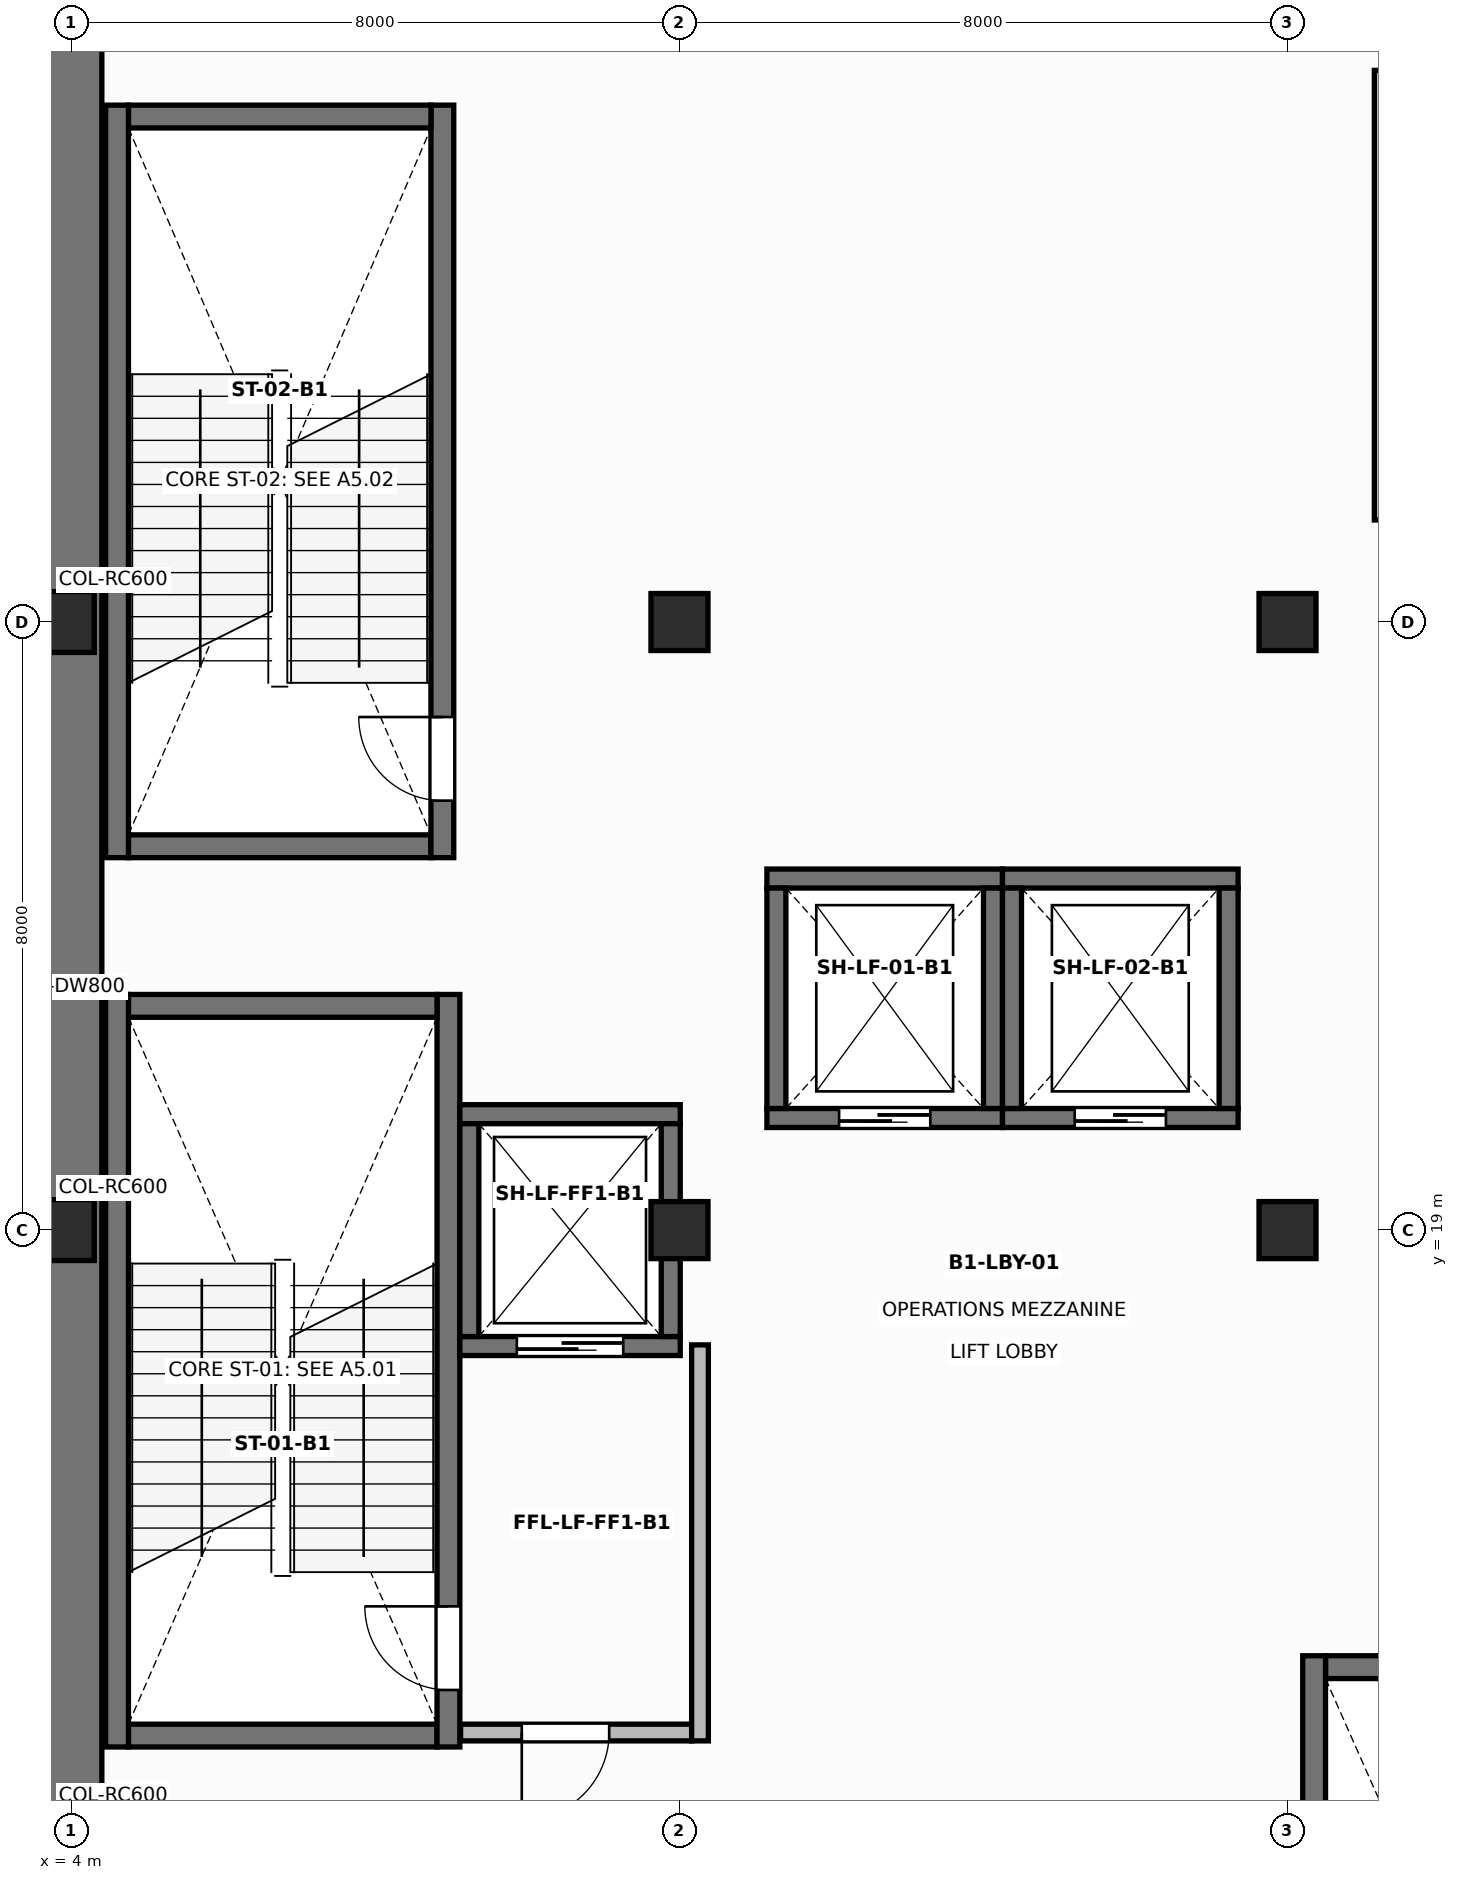
"""IFC4 building model, lengths in metres.
Left out: names, types, materials, properties, quantities, classifications, styles, units other than length and angle.
Written with IfcOpenShell. Run it as: python <this file> out.ifc"""

import sys

from ifc_helpers import new_model, si_unit, direction, frame, frame_2d, origin, origin_2d, place, context, subcontext, project, spatial, rectangle, extrude, element, fill, save


model = new_model("IFC4")
c1 = context("Model", 3, precision=1e-05, world=origin(), true_north=direction((0.0, 1.0)))
c2 = subcontext(c1, "Body", "Model", "MODEL_VIEW")
j1 = project(units=[si_unit("LENGTHUNIT", "METRE"), si_unit("PLANEANGLEUNIT", "RADIAN")], contexts=[c1])
p1 = place(None, origin())
s1 = spatial("IfcSite", under=j1, at=p1, CompositionType="ELEMENT")
p2 = place(p1, origin())
s2 = spatial("IfcBuilding", under=s1, at=p2, CompositionType="ELEMENT")
p3 = place(p2, frame((0.0, 0.0, -5.6)))
s3 = spatial("IfcBuildingStorey", under=s2, at=p3, CompositionType="ELEMENT", Elevation=-5.6)
p4 = place(p3, frame((4.0, 2.6, 0.0), z_axis=(0.0, 0.0, 1.0), x_axis=(0.0, 1.0, 0.0)))
e1 = element("IfcWall", 1, at=p4, inside=s3, PredefinedType="SOLIDWALL", context=c2, shape_type="SweptSolid", body=[
    extrude(rectangle(XDim=114.8, YDim=0.8, at=frame_2d((57.4, 0.0))), origin(), (0.0, 0.0, 1.0), 5.18),
])
for number, where, z_axis, x_axis in (
    (2, (4.0, 19.0, 0.0), (0.0, 0.0, 1.0), (1.0, 0.0, 0.0)),
    (3, (4.0, 27.0, 0.0), (0.0, 0.0, 1.0), (1.0, 0.0, 0.0)),
):
    element("IfcColumn", number, at=place(p3, frame(where, z_axis=z_axis, x_axis=x_axis)), inside=s3, PredefinedType="PILASTER", context=c2, shape_type="SweptSolid", body=[
        extrude(rectangle(XDim=0.6, YDim=0.8, at=origin_2d()), origin(), (0.0, 0.0, 1.0), 5.6),
    ])
for number, where, z_axis, x_axis in (
    (4, (12.0, 19.0, 0.0), (0.0, 0.0, 1.0), (1.0, 0.0, 0.0)),
    (5, (12.0, 27.0, 0.0), (0.0, 0.0, 1.0), (1.0, 0.0, 0.0)),
    (6, (20.0, 19.0, 0.0), (0.0, 0.0, 1.0), (1.0, 0.0, 0.0)),
    (7, (20.0, 27.0, 0.0), (0.0, 0.0, 1.0), (1.0, 0.0, 0.0)),
):
    element("IfcColumn", number, at=place(p3, frame(where, z_axis=z_axis, x_axis=x_axis)), inside=s3, PredefinedType="COLUMN", context=c2, shape_type="SweptSolid", body=[
        extrude(rectangle(XDim=0.75, YDim=0.75, at=origin_2d()), origin(), (0.0, 0.0, 1.0), 5.6),
    ])
p5 = place(p3, frame((4.75, 12.35, 0.0), z_axis=(0.0, 0.0, 1.0), x_axis=(1.0, 0.0, 0.0)))
e8 = element("IfcWall", 8, at=p5, inside=s3, PredefinedType="SHEAR", context=c2, shape_type="SweptSolid", body=[
    extrude(rectangle(XDim=4.06, YDim=0.3, at=frame_2d((2.03, 0.0))), origin(), (0.0, 0.0, 1.0), 5.275),
])
p6 = place(p3, frame((8.96, 12.2, 0.0), z_axis=(0.0, 0.0, 1.0), x_axis=(0.0, 1.0, 0.0)))
e9 = element("IfcWall", 9, at=p6, inside=s3, PredefinedType="SHEAR", context=c2, shape_type="SweptSolid", body=[
    extrude(rectangle(XDim=9.9, YDim=0.3, at=frame_2d((4.95, 0.0))), origin(), (0.0, 0.0, 1.0), 5.275),
])
p7 = place(p6, frame((0.75, 0.0, 0.0)))
e10 = element("IfcOpeningElement", 10, at=p7, cuts=e9, PredefinedType="OPENING", context=c2, shape_type="SweptSolid", body=[
    extrude(rectangle(XDim=1.1, YDim=2.15, at=frame_2d((0.55, 1.075))), frame((0.0, 0.16, 0.0), z_axis=(0.0, -1.0, 0.0), x_axis=(1.0, 0.0, 0.0)), (0.0, 0.0, 1.0), 0.32),
])
p8 = place(p3, frame((8.81, 21.95, 0.0), z_axis=(0.0, 0.0, 1.0), x_axis=(-1.0, 0.0, 0.0)))
e11 = element("IfcWall", 11, at=p8, inside=s3, PredefinedType="SHEAR", context=c2, shape_type="SweptSolid", body=[
    extrude(rectangle(XDim=4.06, YDim=0.3, at=frame_2d((2.03, 0.0))), origin(), (0.0, 0.0, 1.0), 5.275),
])
p9 = place(p3, frame((4.6, 22.1, 0.0), z_axis=(0.0, 0.0, 1.0), x_axis=(0.0, -1.0, 0.0)))
e12 = element("IfcWall", 12, at=p9, inside=s3, PredefinedType="SHEAR", context=c2, shape_type="SweptSolid", body=[
    extrude(rectangle(XDim=9.9, YDim=0.3, at=frame_2d((4.95, 0.0))), origin(), (0.0, 0.0, 1.0), 5.275),
])
p10 = place(p3, frame((4.75, 24.05, 0.0), z_axis=(0.0, 0.0, 1.0), x_axis=(1.0, 0.0, 0.0)))
e13 = element("IfcWall", 13, at=p10, inside=s3, PredefinedType="SHEAR", context=c2, shape_type="SweptSolid", body=[
    extrude(rectangle(XDim=3.98, YDim=0.3, at=frame_2d((1.99, 0.0))), origin(), (0.0, 0.0, 1.0), 5.275),
])
p11 = place(p3, frame((8.88, 23.9, 0.0), z_axis=(0.0, 0.0, 1.0), x_axis=(0.0, 1.0, 0.0)))
e14 = element("IfcWall", 14, at=p11, inside=s3, PredefinedType="SHEAR", context=c2, shape_type="SweptSolid", body=[
    extrude(rectangle(XDim=9.9, YDim=0.3, at=frame_2d((4.95, 0.0))), origin(), (0.0, 0.0, 1.0), 5.275),
])
p12 = place(p11, frame((0.75, 0.0, 0.0)))
e15 = element("IfcOpeningElement", 15, at=p12, cuts=e14, PredefinedType="OPENING", context=c2, shape_type="SweptSolid", body=[
    extrude(rectangle(XDim=1.1, YDim=2.15, at=frame_2d((0.55, 1.075))), frame((0.0, 0.16, 0.0), z_axis=(0.0, -1.0, 0.0), x_axis=(1.0, 0.0, 0.0)), (0.0, 0.0, 1.0), 0.32),
])
p13 = place(p3, frame((8.73, 33.65, 0.0), z_axis=(0.0, 0.0, 1.0), x_axis=(-1.0, 0.0, 0.0)))
e16 = element("IfcWall", 16, at=p13, inside=s3, PredefinedType="SHEAR", context=c2, shape_type="SweptSolid", body=[
    extrude(rectangle(XDim=3.98, YDim=0.3, at=frame_2d((1.99, 0.0))), origin(), (0.0, 0.0, 1.0), 5.275),
])
p14 = place(p3, frame((4.6, 33.8, 0.0), z_axis=(0.0, 0.0, 1.0), x_axis=(0.0, -1.0, 0.0)))
e17 = element("IfcWall", 17, at=p14, inside=s3, PredefinedType="SHEAR", context=c2, shape_type="SweptSolid", body=[
    extrude(rectangle(XDim=9.9, YDim=0.3, at=frame_2d((4.95, 0.0))), origin(), (0.0, 0.0, 1.0), 5.275),
])
p15 = place(p3, frame((24.66, 13.25, 0.0), z_axis=(0.0, 0.0, 1.0), x_axis=(-1.0, 0.0, 0.0)))
e18 = element("IfcWall", 18, at=p15, inside=s3, PredefinedType="SHEAR", context=c2, shape_type="SweptSolid", body=[
    extrude(rectangle(XDim=4.16, YDim=0.3, at=frame_2d((2.08, 0.0))), origin(), (0.0, 0.0, 1.0), 5.275),
])
p16 = place(p3, frame((20.35, 13.4, 0.0), z_axis=(0.0, 0.0, 1.0), x_axis=(0.0, -1.0, 0.0)))
e19 = element("IfcWall", 19, at=p16, inside=s3, PredefinedType="SHEAR", context=c2, shape_type="SweptSolid", body=[
    extrude(rectangle(XDim=10.0, YDim=0.3, at=frame_2d((5.0, 0.0))), origin(), (0.0, 0.0, 1.0), 5.275),
])
p17 = place(p3, frame((9.11, 17.475, 0.0), z_axis=(0.0, 0.0, 1.0), x_axis=(1.0, 0.0, 0.0)))
e20 = element("IfcWall", 20, at=p17, inside=s3, PredefinedType="SOLIDWALL", context=c2, shape_type="SweptSolid", body=[
    extrude(rectangle(XDim=2.9, YDim=0.25, at=frame_2d((1.45, 0.0))), origin(), (0.0, 0.0, 1.0), 5.275),
])
p18 = place(p17, frame((0.75, 0.0, 0.0)))
e21 = element("IfcOpeningElement", 21, at=p18, cuts=e20, PredefinedType="OPENING", context=c2, shape_type="SweptSolid", body=[
    extrude(rectangle(XDim=1.4, YDim=2.25, at=frame_2d((0.7, 1.125))), frame((0.0, 0.135, 0.0), z_axis=(0.0, -1.0, 0.0), x_axis=(1.0, 0.0, 0.0)), (0.0, 0.0, 1.0), 0.27),
])
p19 = place(p3, frame((12.01, 20.525, 0.0), z_axis=(0.0, 0.0, 1.0), x_axis=(-1.0, 0.0, 0.0)))
e22 = element("IfcWall", 22, at=p19, inside=s3, PredefinedType="SOLIDWALL", context=c2, shape_type="SweptSolid", body=[
    extrude(rectangle(XDim=2.9, YDim=0.25, at=frame_2d((1.45, 0.0))), origin(), (0.0, 0.0, 1.0), 5.275),
])
for number, where, z_axis, x_axis in (
    (23, (11.885, 17.6, 0.0), (0.0, 0.0, 1.0), (0.0, 1.0, 0.0)),
    (24, (9.235, 20.4, 0.0), (0.0, 0.0, 1.0), (0.0, -1.0, 0.0)),
):
    element("IfcWall", number, at=place(p3, frame(where, z_axis=z_axis, x_axis=x_axis)), inside=s3, PredefinedType="SOLIDWALL", context=c2, shape_type="SweptSolid", body=[
        extrude(rectangle(XDim=2.8, YDim=0.25, at=frame_2d((1.4, 0.0))), origin(), (0.0, 0.0, 1.0), 5.275),
    ])
p20 = place(p3, frame((9.12, 12.39, 0.0), z_axis=(0.0, 0.0, 1.0), x_axis=(1.0, 0.0, 0.0)))
e25 = element("IfcWall", 25, at=p20, inside=s3, PredefinedType="SOLIDWALL", context=c2, shape_type="SweptSolid", body=[
    extrude(rectangle(XDim=3.04, YDim=0.22, at=frame_2d((1.52, 0.0))), origin(), (0.0, 0.0, 1.0), 4.475),
])
p21 = place(p20, frame((0.805, 0.0, 0.0)))
e26 = element("IfcOpeningElement", 26, at=p21, cuts=e25, PredefinedType="OPENING", context=c2, shape_type="SweptSolid", body=[
    extrude(rectangle(XDim=1.15, YDim=2.15, at=frame_2d((0.575, 1.075))), frame((0.0, 0.12, 0.0), z_axis=(0.0, -1.0, 0.0), x_axis=(1.0, 0.0, 0.0)), (0.0, 0.0, 1.0), 0.24),
])
p22 = place(p3, frame((12.27, 12.28, 0.0), z_axis=(0.0, 0.0, 1.0), x_axis=(0.0, 1.0, 0.0)))
e27 = element("IfcWall", 27, at=p22, inside=s3, PredefinedType="SOLIDWALL", context=c2, shape_type="SweptSolid", body=[
    extrude(rectangle(XDim=5.21, YDim=0.22, at=frame_2d((2.605, 0.0))), origin(), (0.0, 0.0, 1.0), 4.475),
])
p23 = place(p3, frame((13.15, 20.475, 0.0), z_axis=(0.0, 0.0, 1.0), x_axis=(1.0, 0.0, 0.0)))
e28 = element("IfcWall", 28, at=p23, inside=s3, PredefinedType="SOLIDWALL", context=c2, shape_type="SweptSolid", body=[
    extrude(rectangle(XDim=3.1, YDim=0.25, at=frame_2d((1.55, 0.0))), origin(), (0.0, 0.0, 1.0), 5.275),
])
p24 = place(p23, frame((0.95, 0.0, 0.0)))
e29 = element("IfcOpeningElement", 29, at=p24, cuts=e28, PredefinedType="OPENING", context=c2, shape_type="SweptSolid", body=[
    extrude(rectangle(XDim=1.2, YDim=2.2, at=frame_2d((0.6, 1.1))), frame((0.0, 0.135, 0.0), z_axis=(0.0, -1.0, 0.0), x_axis=(1.0, 0.0, 0.0)), (0.0, 0.0, 1.0), 0.27),
])
p25 = place(p3, frame((16.25, 23.625, 0.0), z_axis=(0.0, 0.0, 1.0), x_axis=(-1.0, 0.0, 0.0)))
e30 = element("IfcWall", 30, at=p25, inside=s3, PredefinedType="SOLIDWALL", context=c2, shape_type="SweptSolid", body=[
    extrude(rectangle(XDim=3.1, YDim=0.25, at=frame_2d((1.55, 0.0))), origin(), (0.0, 0.0, 1.0), 5.275),
])
for number, where, z_axis, x_axis in (
    (31, (16.125, 20.6, 0.0), (0.0, 0.0, 1.0), (0.0, 1.0, 0.0)),
    (32, (13.275, 23.5, 0.0), (0.0, 0.0, 1.0), (0.0, -1.0, 0.0)),
):
    element("IfcWall", number, at=place(p3, frame(where, z_axis=z_axis, x_axis=x_axis)), inside=s3, PredefinedType="SOLIDWALL", context=c2, shape_type="SweptSolid", body=[
        extrude(rectangle(XDim=2.9, YDim=0.25, at=frame_2d((1.45, 0.0))), origin(), (0.0, 0.0, 1.0), 5.275),
    ])
p26 = place(p3, frame((16.25, 20.475, 0.0), z_axis=(0.0, 0.0, 1.0), x_axis=(1.0, 0.0, 0.0)))
e33 = element("IfcWall", 33, at=p26, inside=s3, PredefinedType="SOLIDWALL", context=c2, shape_type="SweptSolid", body=[
    extrude(rectangle(XDim=3.1, YDim=0.25, at=frame_2d((1.55, 0.0))), origin(), (0.0, 0.0, 1.0), 5.275),
])
p27 = place(p26, frame((0.95, 0.0, 0.0)))
e34 = element("IfcOpeningElement", 34, at=p27, cuts=e33, PredefinedType="OPENING", context=c2, shape_type="SweptSolid", body=[
    extrude(rectangle(XDim=1.2, YDim=2.2, at=frame_2d((0.6, 1.1))), frame((0.0, 0.135, 0.0), z_axis=(0.0, -1.0, 0.0), x_axis=(1.0, 0.0, 0.0)), (0.0, 0.0, 1.0), 0.27),
])
p28 = place(p3, frame((19.35, 23.625, 0.0), z_axis=(0.0, 0.0, 1.0), x_axis=(-1.0, 0.0, 0.0)))
e35 = element("IfcWall", 35, at=p28, inside=s3, PredefinedType="SOLIDWALL", context=c2, shape_type="SweptSolid", body=[
    extrude(rectangle(XDim=3.1, YDim=0.25, at=frame_2d((1.55, 0.0))), origin(), (0.0, 0.0, 1.0), 5.275),
])
for number, where, z_axis, x_axis in (
    (36, (19.225, 20.6, 0.0), (0.0, 0.0, 1.0), (0.0, 1.0, 0.0)),
    (37, (16.375, 23.5, 0.0), (0.0, 0.0, 1.0), (0.0, -1.0, 0.0)),
):
    element("IfcWall", number, at=place(p3, frame(where, z_axis=z_axis, x_axis=x_axis)), inside=s3, PredefinedType="SOLIDWALL", context=c2, shape_type="SweptSolid", body=[
        extrude(rectangle(XDim=2.9, YDim=0.25, at=frame_2d((1.45, 0.0))), origin(), (0.0, 0.0, 1.0), 5.275),
    ])
p29 = place(p3, frame((21.2, 34.258, 0.0), z_axis=(0.0, 0.0, 1.0), x_axis=(0.0, -1.0, 0.0)))
e38 = element("IfcWall", 38, at=p29, inside=s3, PredefinedType="PARTITIONING", context=c2, shape_type="SweptSolid", body=[
    extrude(rectangle(XDim=5.916, YDim=0.115, at=frame_2d((2.958, 0.0))), origin(), (0.0, 0.0, 1.0), 4.625),
])
p30 = place(p7, origin())
e39 = element("IfcDoor", 39, at=p30, inside=s3, OperationType="SINGLE_SWING_RIGHT", PredefinedType="DOOR", context=c2, shape_type="SweptSolid", body=[
    extrude(rectangle(XDim=1.1, YDim=2.15, at=frame_2d((0.55, 1.075))), frame((0.0, 0.025, 0.0), z_axis=(0.0, -1.0, 0.0), x_axis=(1.0, 0.0, 0.0)), (0.0, 0.0, 1.0), 0.05),
])
fill(e10, e39)
p31 = place(p12, origin())
e40 = element("IfcDoor", 40, at=p31, inside=s3, OperationType="SINGLE_SWING_RIGHT", PredefinedType="DOOR", context=c2, shape_type="SweptSolid", body=[
    extrude(rectangle(XDim=1.1, YDim=2.15, at=frame_2d((0.55, 1.075))), frame((0.0, 0.025, 0.0), z_axis=(0.0, -1.0, 0.0), x_axis=(1.0, 0.0, 0.0)), (0.0, 0.0, 1.0), 0.05),
])
fill(e15, e40)
p32 = place(p18, frame((1.4, 0.0, 0.0), z_axis=(0.0, 0.0, 1.0), x_axis=(-1.0, 0.0, 0.0)))
e41 = element("IfcDoor", 41, at=p32, inside=s3, OperationType="DOUBLE_DOOR_SLIDING", PredefinedType="DOOR", context=c2, shape_type="SweptSolid", body=[
    extrude(rectangle(XDim=1.4, YDim=2.25, at=frame_2d((0.7, 1.125))), frame((0.0, 0.025, 0.0), z_axis=(0.0, -1.0, 0.0), x_axis=(1.0, 0.0, 0.0)), (0.0, 0.0, 1.0), 0.05),
])
fill(e21, e41)
p33 = place(p21, frame((1.15, 0.0, 0.0), z_axis=(0.0, 0.0, 1.0), x_axis=(-1.0, 0.0, 0.0)))
e42 = element("IfcDoor", 42, at=p33, inside=s3, OperationType="SINGLE_SWING_LEFT", PredefinedType="DOOR", context=c2, shape_type="SweptSolid", body=[
    extrude(rectangle(XDim=1.15, YDim=2.15, at=frame_2d((0.575, 1.075))), frame((0.0, 0.025, 0.0), z_axis=(0.0, -1.0, 0.0), x_axis=(1.0, 0.0, 0.0)), (0.0, 0.0, 1.0), 0.05),
])
fill(e26, e42)
p34 = place(p24, frame((1.2, 0.0, 0.0), z_axis=(0.0, 0.0, 1.0), x_axis=(-1.0, 0.0, 0.0)))
e43 = element("IfcDoor", 43, at=p34, inside=s3, OperationType="DOUBLE_DOOR_SLIDING", PredefinedType="DOOR", context=c2, shape_type="SweptSolid", body=[
    extrude(rectangle(XDim=1.2, YDim=2.2, at=frame_2d((0.6, 1.1))), frame((0.0, 0.025, 0.0), z_axis=(0.0, -1.0, 0.0), x_axis=(1.0, 0.0, 0.0)), (0.0, 0.0, 1.0), 0.05),
])
fill(e29, e43)
p35 = place(p27, frame((1.2, 0.0, 0.0), z_axis=(0.0, 0.0, 1.0), x_axis=(-1.0, 0.0, 0.0)))
e44 = element("IfcDoor", 44, at=p35, inside=s3, OperationType="DOUBLE_DOOR_SLIDING", PredefinedType="DOOR", context=c2, shape_type="SweptSolid", body=[
    extrude(rectangle(XDim=1.2, YDim=2.2, at=frame_2d((0.6, 1.1))), frame((0.0, 0.025, 0.0), z_axis=(0.0, -1.0, 0.0), x_axis=(1.0, 0.0, 0.0)), (0.0, 0.0, 1.0), 0.05),
])
fill(e34, e44)
save(model, sys.argv[1])
